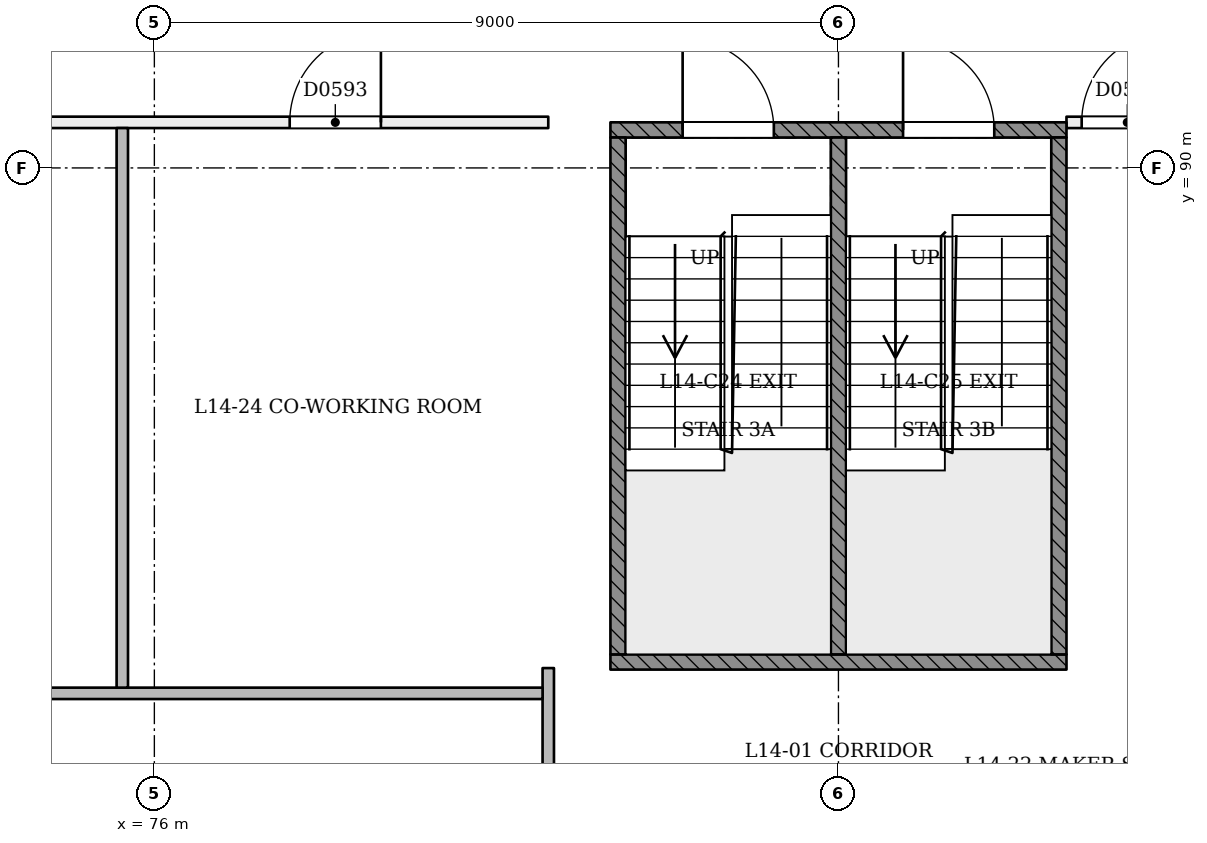
"""IFC4 building model, lengths in metres.
Left out: names, types, materials, properties, quantities, classifications, styles, units other than length and angle.
Written with IfcOpenShell. Run it as: python <this file> out.ifc"""

import sys

from ifc_helpers import new_model, si_unit, direction, frame, frame_2d, origin, place, context, subcontext, project, spatial, rectangle, extrude, element, fill, save


model = new_model("IFC4")
c1 = context("Model", 3, precision=1e-05, world=origin(), true_north=direction((0.0, 1.0)))
c2 = subcontext(c1, "Body", "Model", "MODEL_VIEW")
j1 = project(units=[si_unit("LENGTHUNIT", "METRE"), si_unit("PLANEANGLEUNIT", "RADIAN")], contexts=[c1])
p1 = place(None, origin())
s1 = spatial("IfcSite", under=j1, at=p1, CompositionType="ELEMENT")
p2 = place(p1, origin())
s2 = spatial("IfcBuilding", under=s1, at=p2, CompositionType="ELEMENT")
p3 = place(p2, frame((0.0, 0.0, 59.4)))
s3 = spatial("IfcBuildingStorey", under=s2, at=p3, CompositionType="ELEMENT", Elevation=59.4)
p4 = place(p3, frame((62.256, 96.887, 0.0), z_axis=(0.0, 0.0, 1.0), x_axis=(0.500001966348, -0.86602426851, 0.0)))
e1 = element("IfcWall", 1, at=p4, inside=s3, PredefinedType="PARTITIONING", context=c2, shape_type="SweptSolid", body=[
    extrude(rectangle(XDim=43.626, YDim=0.15, at=frame_2d((21.813, 0.0))), origin(), (0.0, 0.0, 1.0), 2.7),
])
p5 = place(p4, frame((3.556, 0.0, 0.0)))
e2 = element("IfcOpeningElement", 2, at=p5, cuts=e1, PredefinedType="OPENING", context=c2, shape_type="SweptSolid", body=[
    extrude(rectangle(XDim=1.2, YDim=2.1, at=frame_2d((0.6, 1.05))), frame((0.0, 0.085, 0.0), z_axis=(0.0, -1.0, 0.0), x_axis=(1.0, 0.0, 0.0)), (0.0, 0.0, 1.0), 0.171),
])
p6 = place(p4, frame((12.213, 0.0, 0.0)))
e3 = element("IfcOpeningElement", 3, at=p6, cuts=e1, PredefinedType="OPENING", context=c2, shape_type="SweptSolid", body=[
    extrude(rectangle(XDim=1.2, YDim=2.1, at=frame_2d((0.6, 1.05))), frame((0.0, 0.085, 0.0), z_axis=(0.0, -1.0, 0.0), x_axis=(1.0, 0.0, 0.0)), (0.0, 0.0, 1.0), 0.171),
])
p7 = place(p4, frame((19.063, 0.0, 0.0)))
e4 = element("IfcOpeningElement", 4, at=p7, cuts=e1, PredefinedType="OPENING", context=c2, shape_type="SweptSolid", body=[
    extrude(rectangle(XDim=1.0, YDim=2.1, at=frame_2d((0.5, 1.05))), frame((0.0, 0.085, 0.0), z_axis=(0.0, -1.0, 0.0), x_axis=(1.0, 0.0, 0.0)), (0.0, 0.0, 1.0), 0.171),
])
p8 = place(p4, frame((27.963, 0.0, 0.0)))
e5 = element("IfcOpeningElement", 5, at=p8, cuts=e1, PredefinedType="OPENING", context=c2, shape_type="SweptSolid", body=[
    extrude(rectangle(XDim=1.2, YDim=2.1, at=frame_2d((0.6, 1.05))), frame((0.0, 0.085, 0.0), z_axis=(0.0, -1.0, 0.0), x_axis=(1.0, 0.0, 0.0)), (0.0, 0.0, 1.0), 0.171),
])
p9 = place(p4, frame((38.869, 0.0, 0.0)))
e6 = element("IfcOpeningElement", 6, at=p9, cuts=e1, PredefinedType="OPENING", context=c2, shape_type="SweptSolid", body=[
    extrude(rectangle(XDim=1.2, YDim=2.1, at=frame_2d((0.6, 1.05))), frame((0.0, 0.085, 0.0), z_axis=(0.0, -1.0, 0.0), x_axis=(1.0, 0.0, 0.0)), (0.0, 0.0, 1.0), 0.171),
])
p10 = place(p3, frame((85.931, 59.106, 0.0), z_axis=(0.0, 0.0, 1.0), x_axis=(0.499999543107, 0.866025667572, 0.0)))
e7 = element("IfcWall", 7, at=p10, inside=s3, PredefinedType="PARTITIONING", context=c2, shape_type="SweptSolid", body=[
    extrude(rectangle(XDim=43.626, YDim=0.15, at=frame_2d((21.813, 0.0))), origin(), (0.0, 0.0, 1.0), 2.7),
])
p11 = place(p10, frame((3.556, 0.0, 0.0)))
e8 = element("IfcOpeningElement", 8, at=p11, cuts=e7, PredefinedType="OPENING", context=c2, shape_type="SweptSolid", body=[
    extrude(rectangle(XDim=1.2, YDim=2.1, at=frame_2d((0.6, 1.05))), frame((0.0, 0.085, 0.0), z_axis=(0.0, -1.0, 0.0), x_axis=(1.0, 0.0, 0.0)), (0.0, 0.0, 1.0), 0.171),
])
p12 = place(p10, frame((14.463, 0.0, 0.0)))
e9 = element("IfcOpeningElement", 9, at=p12, cuts=e7, PredefinedType="OPENING", context=c2, shape_type="SweptSolid", body=[
    extrude(rectangle(XDim=1.2, YDim=2.1, at=frame_2d((0.6, 1.05))), frame((0.0, 0.085, 0.0), z_axis=(0.0, -1.0, 0.0), x_axis=(1.0, 0.0, 0.0)), (0.0, 0.0, 1.0), 0.171),
])
p13 = place(p10, frame((27.963, 0.0, 0.0)))
e10 = element("IfcOpeningElement", 10, at=p13, cuts=e7, PredefinedType="OPENING", context=c2, shape_type="SweptSolid", body=[
    extrude(rectangle(XDim=1.2, YDim=2.1, at=frame_2d((0.6, 1.05))), frame((0.0, 0.085, 0.0), z_axis=(0.0, -1.0, 0.0), x_axis=(1.0, 0.0, 0.0)), (0.0, 0.0, 1.0), 0.171),
])
p14 = place(p10, frame((38.869, 0.0, 0.0)))
e11 = element("IfcOpeningElement", 11, at=p14, cuts=e7, PredefinedType="OPENING", context=c2, shape_type="SweptSolid", body=[
    extrude(rectangle(XDim=1.2, YDim=2.1, at=frame_2d((0.6, 1.05))), frame((0.0, 0.085, 0.0), z_axis=(0.0, -1.0, 0.0), x_axis=(1.0, 0.0, 0.0)), (0.0, 0.0, 1.0), 0.171),
])
p15 = place(p3, frame((102.035, 90.6, 0.0), z_axis=(0.0, 0.0, 1.0), x_axis=(-0.49999785657, -0.866026641291, 0.0)))
e12 = element("IfcWall", 12, at=p15, inside=s3, PredefinedType="PARTITIONING", context=c2, shape_type="SweptSolid", body=[
    extrude(rectangle(XDim=34.071, YDim=0.15, at=frame_2d((17.036, 0.0))), origin(), (0.0, 0.0, 1.0), 3.1),
])
p16 = place(p15, frame((25.659, 0.0, 0.0)))
e13 = element("IfcOpeningElement", 13, at=p16, cuts=e12, PredefinedType="OPENING", context=c2, shape_type="SweptSolid", body=[
    extrude(rectangle(XDim=1.2, YDim=2.1, at=frame_2d((0.6, 1.05))), frame((0.0, 0.085, 0.0), z_axis=(0.0, -1.0, 0.0), x_axis=(1.0, 0.0, 0.0)), (0.0, 0.0, 1.0), 0.171),
])
p17 = place(p15, frame((6.829, 0.0, 0.0)))
e14 = element("IfcOpeningElement", 14, at=p17, cuts=e12, PredefinedType="OPENING", context=c2, shape_type="SweptSolid", body=[
    extrude(rectangle(XDim=1.2, YDim=2.1, at=frame_2d((0.6, 1.05))), frame((0.0, 0.085, 0.0), z_axis=(0.0, -1.0, 0.0), x_axis=(1.0, 0.0, 0.0)), (0.0, 0.0, 1.0), 0.171),
])
p18 = place(p3, frame((84.935, 61.206, 0.0), z_axis=(0.0, 0.0, 1.0), x_axis=(-0.499998703304, 0.866026152431, 0.0)))
e15 = element("IfcWall", 15, at=p18, inside=s3, PredefinedType="PARTITIONING", context=c2, shape_type="SweptSolid", body=[
    extrude(rectangle(XDim=33.941, YDim=0.15, at=frame_2d((16.97, 0.0))), origin(), (0.0, 0.0, 1.0), 3.1),
])
p19 = place(p18, frame((11.511, 0.0, 0.0)))
e16 = element("IfcOpeningElement", 16, at=p19, cuts=e15, PredefinedType="OPENING", context=c2, shape_type="SweptSolid", body=[
    extrude(rectangle(XDim=1.2, YDim=2.1, at=frame_2d((0.6, 1.05))), frame((0.0, 0.085, 0.0), z_axis=(0.0, -1.0, 0.0), x_axis=(1.0, 0.0, 0.0)), (0.0, 0.0, 1.0), 0.171),
])
p20 = place(p18, frame((19.426, 0.0, 0.0)))
e17 = element("IfcOpeningElement", 17, at=p20, cuts=e15, PredefinedType="OPENING", context=c2, shape_type="SweptSolid", body=[
    extrude(rectangle(XDim=1.2, YDim=2.1, at=frame_2d((0.6, 1.05))), frame((0.0, 0.085, 0.0), z_axis=(0.0, -1.0, 0.0), x_axis=(1.0, 0.0, 0.0)), (0.0, 0.0, 1.0), 0.171),
])
p21 = place(p18, frame((28.146, 0.0, 0.0)))
e18 = element("IfcOpeningElement", 18, at=p21, cuts=e15, PredefinedType="OPENING", context=c2, shape_type="SweptSolid", body=[
    extrude(rectangle(XDim=1.2, YDim=2.1, at=frame_2d((0.6, 1.05))), frame((0.0, 0.085, 0.0), z_axis=(0.0, -1.0, 0.0), x_axis=(1.0, 0.0, 0.0)), (0.0, 0.0, 1.0), 0.171),
])
p22 = place(p3, frame((88.0, 90.599, 0.0), z_axis=(0.0, 0.0, 1.0), x_axis=(0.999999997534, 7.0228418e-05, 0.0)))
e19 = element("IfcWall", 19, at=p22, inside=s3, PredefinedType="PARTITIONING", context=c2, shape_type="SweptSolid", body=[
    extrude(rectangle(XDim=13.906, YDim=0.15, at=frame_2d((6.953, 0.0))), origin(), (0.0, 0.0, 1.0), 3.1),
])
p23 = place(p22, frame((0.2, 0.0, 0.0)))
e20 = element("IfcOpeningElement", 20, at=p23, cuts=e19, PredefinedType="OPENING", context=c2, shape_type="SweptSolid", body=[
    extrude(rectangle(XDim=1.2, YDim=2.1, at=frame_2d((0.6, 1.05))), frame((0.0, 0.085, 0.0), z_axis=(0.0, -1.0, 0.0), x_axis=(1.0, 0.0, 0.0)), (0.0, 0.0, 1.0), 0.171),
])
p24 = place(p3, frame((68.094, 90.6, 0.0), z_axis=(0.0, 0.0, 1.0), x_axis=(0.999999997216, -7.4615729e-05, 0.0)))
e21 = element("IfcWall", 21, at=p24, inside=s3, PredefinedType="PARTITIONING", context=c2, shape_type="SweptSolid", body=[
    extrude(rectangle(XDim=13.088, YDim=0.15, at=frame_2d((6.544, 0.0))), origin(), (0.0, 0.0, 1.0), 3.1),
])
p25 = place(p24, frame((9.686, 0.0, 0.0)))
e22 = element("IfcOpeningElement", 22, at=p25, cuts=e21, PredefinedType="OPENING", context=c2, shape_type="SweptSolid", body=[
    extrude(rectangle(XDim=1.2, YDim=2.1, at=frame_2d((0.6, 1.05))), frame((0.0, 0.085, 0.0), z_axis=(0.0, -1.0, 0.0), x_axis=(1.0, 0.0, 0.0)), (0.0, 0.0, 1.0), 0.171),
])
p26 = place(p3, frame((81.182, 83.42, 0.0), z_axis=(0.0, 0.0, 1.0), x_axis=(0.0, -1.0, 0.0)))
e23 = element("IfcWall", 23, at=p26, inside=s3, PredefinedType="PARTITIONING", context=c2, shape_type="SweptSolid", body=[
    extrude(rectangle(XDim=6.831, YDim=0.15, at=frame_2d((3.415, 0.0))), origin(), (0.0, 0.0, 1.0), 3.1),
])
p27 = place(p3, frame((81.107, 83.088, 0.0), z_axis=(0.0, 0.0, 1.0), x_axis=(-1.0, 0.0, 0.0)))
e24 = element("IfcWall", 24, at=p27, inside=s3, PredefinedType="PARTITIONING", context=c2, shape_type="SweptSolid", body=[
    extrude(rectangle(XDim=8.676, YDim=0.15, at=frame_2d((4.338, 0.0))), origin(), (0.0, 0.0, 1.0), 3.1),
])
p28 = place(p3, frame((75.578, 90.524, 0.0), z_axis=(0.0, 0.0, 1.0), x_axis=(0.0, -1.0, 0.0)))
e25 = element("IfcWall", 25, at=p28, inside=s3, PredefinedType="PARTITIONING", context=c2, shape_type="SweptSolid", body=[
    extrude(rectangle(XDim=7.362, YDim=0.15, at=frame_2d((3.681, 0.0))), origin(), (0.0, 0.0, 1.0), 3.1),
])
p29 = place(p3, frame((82.0, 90.5, 0.0), z_axis=(0.0, 0.0, 1.0), x_axis=(1.0, 0.0, 0.0)))
e26 = element("IfcWall", 26, at=p29, inside=s3, PredefinedType="SOLIDWALL", context=c2, shape_type="SweptSolid", body=[
    extrude(rectangle(XDim=6.0, YDim=0.2, at=frame_2d((3.0, 0.0))), origin(), (0.0, 0.0, 1.0), 3.1),
])
p30 = place(p29, frame((0.95, 0.0, 0.0)))
e27 = element("IfcOpeningElement", 27, at=p30, cuts=e26, PredefinedType="OPENING", context=c2, shape_type="SweptSolid", body=[
    extrude(rectangle(XDim=1.2, YDim=2.1, at=frame_2d((0.6, 1.05))), frame((0.0, 0.11, 0.0), z_axis=(0.0, -1.0, 0.0), x_axis=(1.0, 0.0, 0.0)), (0.0, 0.0, 1.0), 0.221),
])
p31 = place(p29, frame((3.85, 0.0, 0.0)))
e28 = element("IfcOpeningElement", 28, at=p31, cuts=e26, PredefinedType="OPENING", context=c2, shape_type="SweptSolid", body=[
    extrude(rectangle(XDim=1.2, YDim=2.1, at=frame_2d((0.6, 1.05))), frame((0.0, 0.11, 0.0), z_axis=(0.0, -1.0, 0.0), x_axis=(1.0, 0.0, 0.0)), (0.0, 0.0, 1.0), 0.221),
])
p32 = place(p3, frame((82.0, 83.5, 0.0), z_axis=(0.0, 0.0, 1.0), x_axis=(1.0, 0.0, 0.0)))
e29 = element("IfcWall", 29, at=p32, inside=s3, PredefinedType="SOLIDWALL", context=c2, shape_type="SweptSolid", body=[
    extrude(rectangle(XDim=6.0, YDim=0.2, at=frame_2d((3.0, 0.0))), origin(), (0.0, 0.0, 1.0), 3.1),
])
for number, where, z_axis, x_axis in (
    (30, (82.1, 83.6, 0.0), (0.0, 0.0, 1.0), (0.0, 1.0, 0.0)),
    (31, (87.9, 83.6, 0.0), (0.0, 0.0, 1.0), (0.0, 1.0, 0.0)),
    (32, (85.0, 83.6, 0.0), (0.0, 0.0, 1.0), (0.0, 1.0, 0.0)),
):
    element("IfcWall", number, at=place(p3, frame(where, z_axis=z_axis, x_axis=x_axis)), inside=s3, PredefinedType="SOLIDWALL", context=c2, shape_type="SweptSolid", body=[
        extrude(rectangle(XDim=6.8, YDim=0.2, at=frame_2d((3.4, 0.0))), origin(), (0.0, 0.0, 1.0), 3.1),
    ])
p33 = place(p23, origin())
e33 = element("IfcDoor", 33, at=p33, inside=s3, OperationType="SINGLE_SWING_RIGHT", PredefinedType="NOTDEFINED", context=c2, shape_type="SweptSolid", body=[
    extrude(rectangle(XDim=1.2, YDim=2.1, at=frame_2d((0.6, 1.05))), frame((0.0, 0.025, 0.0), z_axis=(0.0, -1.0, 0.0), x_axis=(1.0, 0.0, 0.0)), (0.0, 0.0, 1.0), 0.05),
])
fill(e20, e33)
p34 = place(p25, origin())
e34 = element("IfcDoor", 34, at=p34, inside=s3, OperationType="SINGLE_SWING_RIGHT", PredefinedType="NOTDEFINED", context=c2, shape_type="SweptSolid", body=[
    extrude(rectangle(XDim=1.2, YDim=2.1, at=frame_2d((0.6, 1.05))), frame((0.0, 0.025, 0.0), z_axis=(0.0, -1.0, 0.0), x_axis=(1.0, 0.0, 0.0)), (0.0, 0.0, 1.0), 0.05),
])
fill(e22, e34)
p35 = place(p30, origin())
e35 = element("IfcDoor", 35, at=p35, inside=s3, OperationType="SINGLE_SWING_LEFT", PredefinedType="NOTDEFINED", context=c2, shape_type="SweptSolid", body=[
    extrude(rectangle(XDim=1.2, YDim=2.1, at=frame_2d((0.6, 1.05))), frame((0.0, 0.025, 0.0), z_axis=(0.0, -1.0, 0.0), x_axis=(1.0, 0.0, 0.0)), (0.0, 0.0, 1.0), 0.05),
])
fill(e27, e35)
p36 = place(p31, origin())
e36 = element("IfcDoor", 36, at=p36, inside=s3, OperationType="SINGLE_SWING_LEFT", PredefinedType="NOTDEFINED", context=c2, shape_type="SweptSolid", body=[
    extrude(rectangle(XDim=1.2, YDim=2.1, at=frame_2d((0.6, 1.05))), frame((0.0, 0.025, 0.0), z_axis=(0.0, -1.0, 0.0), x_axis=(1.0, 0.0, 0.0)), (0.0, 0.0, 1.0), 0.05),
])
fill(e28, e36)
save(model, sys.argv[1])
